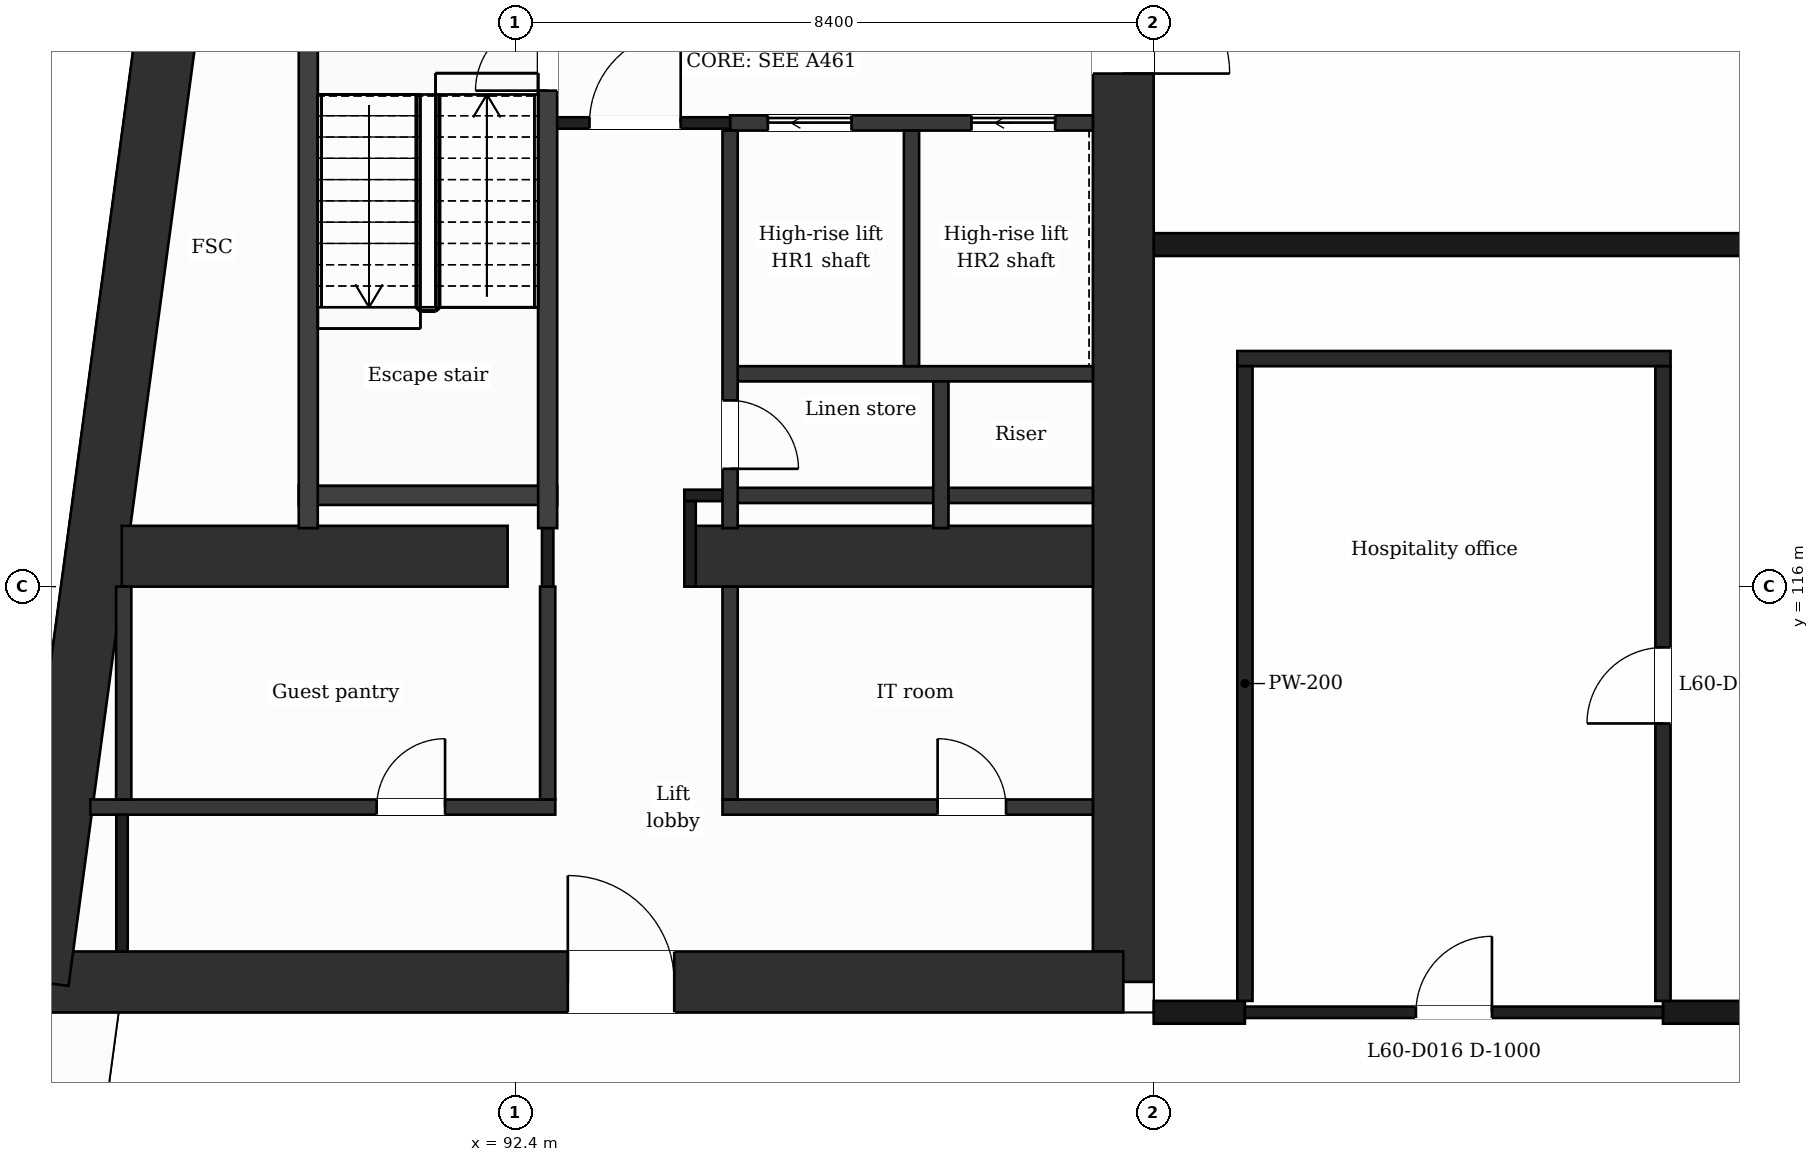
"""IFC4 building model, lengths in metres.
Left out: names, types, materials, properties, quantities, classifications, styles, units other than length and angle.
Written with IfcOpenShell. Run it as: python <this file> out.ifc"""

import sys

from ifc_helpers import new_model, si_unit, direction, frame, frame_2d, origin, place, context, subcontext, project, spatial, rectangle, extrude, element, fill, save


model = new_model("IFC4")
c1 = context("Model", 3, precision=1e-05, world=origin(), true_north=direction((0.0, 1.0)))
c2 = subcontext(c1, "Body", "Model", "MODEL_VIEW")
j1 = project(units=[si_unit("LENGTHUNIT", "METRE"), si_unit("PLANEANGLEUNIT", "RADIAN")], contexts=[c1])
p1 = place(None, origin())
s1 = spatial("IfcSite", under=j1, at=p1, CompositionType="ELEMENT")
p2 = place(p1, origin())
s2 = spatial("IfcBuilding", under=s1, at=p2, CompositionType="ELEMENT")
p3 = place(p2, frame((0.0, 0.0, 246.6)))
s3 = spatial("IfcBuildingStorey", under=s2, at=p3, CompositionType="ELEMENT", Elevation=246.6)
p4 = place(p3, frame((100.4, 132.0, 0.0), z_axis=(0.0, 0.0, 1.0), x_axis=(0.0, -1.0, 0.0)))
e1 = element("IfcWall", 1, at=p4, inside=s3, PredefinedType="SHEAR", context=c2, shape_type="SweptSolid", body=[
    extrude(rectangle(XDim=21.2, YDim=0.8, at=frame_2d((10.6, 0.0))), origin(), (0.0, 0.0, 1.0), 7.4),
])
p5 = place(p4, frame((7.85, 0.0, 0.0)))
e2 = element("IfcOpeningElement", 2, at=p5, cuts=e1, PredefinedType="OPENING", context=c2, shape_type="SweptSolid", body=[
    extrude(rectangle(XDim=1.4, YDim=2.1, at=frame_2d((0.7, 1.05))), frame((0.0, 0.41, 0.0), z_axis=(0.0, -1.0, 0.0), x_axis=(1.0, 0.0, 0.0)), (0.0, 0.0, 1.0), 0.82),
])
p6 = place(p3, frame((100.4, 110.8, 0.0), z_axis=(0.0, 0.0, 1.0), x_axis=(-1.0, 0.0, 0.0)))
e3 = element("IfcWall", 3, at=p6, inside=s3, PredefinedType="SHEAR", context=c2, shape_type="SweptSolid", body=[
    extrude(rectangle(XDim=14.273, YDim=0.8, at=frame_2d((7.137, 0.0))), origin(), (0.0, 0.0, 1.0), 7.4),
])
p7 = place(p6, frame((5.908, 0.0, 0.0)))
e4 = element("IfcOpeningElement", 4, at=p7, cuts=e3, PredefinedType="OPENING", context=c2, shape_type="SweptSolid", body=[
    extrude(rectangle(XDim=1.4, YDim=2.1, at=frame_2d((0.7, 1.05))), frame((0.0, 0.41, 0.0), z_axis=(0.0, -1.0, 0.0), x_axis=(1.0, 0.0, 0.0)), (0.0, 0.0, 1.0), 0.82),
])
p8 = place(p3, frame((86.127, 110.8, 0.0), z_axis=(0.0, 0.0, 1.0), x_axis=(0.133408347329, 0.991061154956, 0.0)))
e5 = element("IfcWall", 5, at=p8, inside=s3, PredefinedType="SHEAR", context=c2, shape_type="SweptSolid", body=[
    extrude(rectangle(XDim=21.391, YDim=0.8, at=frame_2d((10.696, 0.0))), origin(), (0.0, 0.0, 1.0), 7.4),
])
p9 = place(p3, frame((87.223, 116.4, 0.0), z_axis=(0.0, 0.0, 1.0), x_axis=(1.0, 0.0, 0.0)))
e6 = element("IfcWall", 6, at=p9, inside=s3, PredefinedType="SHEAR", context=c2, shape_type="SweptSolid", body=[
    extrude(rectangle(XDim=5.077, YDim=0.8, at=frame_2d((2.539, 0.0))), origin(), (0.0, 0.0, 1.0), 7.4),
])
p10 = place(p3, frame((94.7, 116.4, 0.0), z_axis=(0.0, 0.0, 1.0), x_axis=(1.0, 0.0, 0.0)))
e7 = element("IfcWall", 7, at=p10, inside=s3, PredefinedType="SHEAR", context=c2, shape_type="SweptSolid", body=[
    extrude(rectangle(XDim=5.3, YDim=0.8, at=frame_2d((2.65, 0.0))), origin(), (0.0, 0.0, 1.0), 7.4),
])
p11 = place(p3, frame((100.8, 110.4, 0.0), z_axis=(0.0, 0.0, 1.0), x_axis=(1.0, 0.0, 0.0)))
e8 = element("IfcWall", 8, at=p11, inside=s3, PredefinedType="PARTITIONING", context=c2, shape_type="SweptSolid", body=[
    extrude(rectangle(XDim=1.2, YDim=0.3, at=frame_2d((0.6, 0.0))), origin(), (0.0, 0.0, 1.0), 1.0),
])
p12 = place(p3, frame((107.5, 110.4, 0.0), z_axis=(0.0, 0.0, 1.0), x_axis=(1.0, 0.0, 0.0)))
e9 = element("IfcWall", 9, at=p12, inside=s3, PredefinedType="PARTITIONING", context=c2, shape_type="SweptSolid", body=[
    extrude(rectangle(XDim=3.4, YDim=0.3, at=frame_2d((1.7, 0.0))), origin(), (0.0, 0.0, 1.0), 1.0),
])
p13 = place(p3, frame((102.0, 110.4, 0.0), z_axis=(0.0, 0.0, 1.0), x_axis=(1.0, 0.0, 0.0)))
e10 = element("IfcWall", 10, at=p13, inside=s3, PredefinedType="PARTITIONING", context=c2, shape_type="SweptSolid", body=[
    extrude(rectangle(XDim=5.5, YDim=0.15, at=frame_2d((2.75, 0.0))), origin(), (0.0, 0.0, 1.0), 6.9),
])
p14 = place(p13, frame((2.25, 0.0, 0.0)))
e11 = element("IfcOpeningElement", 11, at=p14, cuts=e10, PredefinedType="OPENING", context=c2, shape_type="SweptSolid", body=[
    extrude(rectangle(XDim=1.0, YDim=2.1, at=frame_2d((0.5, 1.05))), frame((0.0, 0.085, 0.0), z_axis=(0.0, -1.0, 0.0), x_axis=(1.0, 0.0, 0.0)), (0.0, 0.0, 1.0), 0.17),
])
p15 = place(p3, frame((86.81, 113.1, 0.0), z_axis=(0.0, 0.0, 1.0), x_axis=(1.0, 0.0, 0.0)))
e12 = element("IfcWall", 12, at=p15, inside=s3, PredefinedType="PARTITIONING", context=c2, shape_type="SweptSolid", body=[
    extrude(rectangle(XDim=6.117, YDim=0.2, at=frame_2d((3.059, 0.0))), origin(), (0.0, 0.0, 1.0), 6.9),
])
p16 = place(p15, frame((3.767, 0.0, 0.0)))
e13 = element("IfcOpeningElement", 13, at=p16, cuts=e12, PredefinedType="OPENING", context=c2, shape_type="SweptSolid", body=[
    extrude(rectangle(XDim=0.9, YDim=2.1, at=frame_2d((0.45, 1.05))), frame((0.0, 0.11, 0.0), z_axis=(0.0, -1.0, 0.0), x_axis=(1.0, 0.0, 0.0)), (0.0, 0.0, 1.0), 0.22),
])
p17 = place(p3, frame((95.127, 113.1, 0.0), z_axis=(0.0, 0.0, 1.0), x_axis=(1.0, 0.0, 0.0)))
e14 = element("IfcWall", 14, at=p17, inside=s3, PredefinedType="PARTITIONING", context=c2, shape_type="SweptSolid", body=[
    extrude(rectangle(XDim=4.873, YDim=0.2, at=frame_2d((2.437, 0.0))), origin(), (0.0, 0.0, 1.0), 6.9),
])
p18 = place(p17, frame((2.83, 0.0, 0.0)))
e15 = element("IfcOpeningElement", 15, at=p18, cuts=e14, PredefinedType="OPENING", context=c2, shape_type="SweptSolid", body=[
    extrude(rectangle(XDim=0.9, YDim=2.1, at=frame_2d((0.45, 1.05))), frame((0.0, 0.11, 0.0), z_axis=(0.0, -1.0, 0.0), x_axis=(1.0, 0.0, 0.0)), (0.0, 0.0, 1.0), 0.22),
])
p19 = place(p3, frame((95.227, 117.2, 0.0), z_axis=(0.0, 0.0, 1.0), x_axis=(1.0, 0.0, 0.0)))
e16 = element("IfcWall", 16, at=p19, inside=s3, PredefinedType="PARTITIONING", context=c2, shape_type="SweptSolid", body=[
    extrude(rectangle(XDim=4.773, YDim=0.2, at=frame_2d((2.386, 0.0))), origin(), (0.0, 0.0, 1.0), 6.9),
])
p20 = place(p3, frame((94.625, 117.2, 0.0), z_axis=(0.0, 0.0, 1.0), x_axis=(1.0, 0.0, 0.0)))
e17 = element("IfcWall", 17, at=p20, inside=s3, PredefinedType="PARTITIONING", context=c2, shape_type="SweptSolid", body=[
    extrude(rectangle(XDim=0.602, YDim=0.15, at=frame_2d((0.301, 0.0))), origin(), (0.0, 0.0, 1.0), 6.9),
])
p21 = place(p3, frame((89.552, 117.2, 0.0), z_axis=(0.0, 0.0, 1.0), x_axis=(1.0, 0.0, 0.0)))
e18 = element("IfcWall", 18, at=p21, inside=s3, PredefinedType="PARTITIONING", context=c2, shape_type="SweptSolid", body=[
    extrude(rectangle(XDim=3.4, YDim=0.25, at=frame_2d((1.7, 0.0))), origin(), (0.0, 0.0, 1.0), 6.9),
])
p22 = place(p3, frame((95.227, 118.8, 0.0), z_axis=(0.0, 0.0, 1.0), x_axis=(1.0, 0.0, 0.0)))
e19 = element("IfcWall", 19, at=p22, inside=s3, PredefinedType="PARTITIONING", context=c2, shape_type="SweptSolid", body=[
    extrude(rectangle(XDim=4.773, YDim=0.2, at=frame_2d((2.386, 0.0))), origin(), (0.0, 0.0, 1.0), 6.9),
])
p23 = place(p3, frame((101.9, 119.0, 0.0), z_axis=(0.0, 0.0, 1.0), x_axis=(1.0, 0.0, 0.0)))
e20 = element("IfcWall", 20, at=p23, inside=s3, PredefinedType="PARTITIONING", context=c2, shape_type="SweptSolid", body=[
    extrude(rectangle(XDim=5.7, YDim=0.2, at=frame_2d((2.85, 0.0))), origin(), (0.0, 0.0, 1.0), 6.9),
])
p24 = place(p3, frame((100.8, 120.5, 0.0), z_axis=(0.0, 0.0, 1.0), x_axis=(1.0, 0.0, 0.0)))
e21 = element("IfcWall", 21, at=p24, inside=s3, PredefinedType="PARTITIONING", context=c2, shape_type="SweptSolid", body=[
    extrude(rectangle(XDim=25.2, YDim=0.3, at=frame_2d((12.6, 0.0))), origin(), (0.0, 0.0, 1.0), 1.0),
])
p25 = place(p3, frame((95.227, 122.1, 0.0), z_axis=(0.0, 0.0, 1.0), x_axis=(1.0, 0.0, 0.0)))
e22 = element("IfcWall", 22, at=p25, inside=s3, PredefinedType="PARTITIONING", context=c2, shape_type="SweptSolid", body=[
    extrude(rectangle(XDim=4.773, YDim=0.2, at=frame_2d((2.386, 0.0))), origin(), (0.0, 0.0, 1.0), 6.9),
])
p26 = place(p25, frame((0.497, 0.0, 0.0)))
e23 = element("IfcOpeningElement", 23, at=p26, cuts=e22, PredefinedType="OPENING", context=c2, shape_type="SweptSolid", body=[
    extrude(rectangle(XDim=1.1, YDim=2.1, at=frame_2d((0.55, 1.05))), frame((0.0, 0.11, 0.0), z_axis=(0.0, -1.0, 0.0), x_axis=(1.0, 0.0, 0.0)), (0.0, 0.0, 1.0), 0.22),
])
p27 = place(p25, frame((3.176, 0.0, 0.0)))
e24 = element("IfcOpeningElement", 24, at=p27, cuts=e22, PredefinedType="OPENING", context=c2, shape_type="SweptSolid", body=[
    extrude(rectangle(XDim=1.1, YDim=2.1, at=frame_2d((0.55, 1.05))), frame((0.0, 0.11, 0.0), z_axis=(0.0, -1.0, 0.0), x_axis=(1.0, 0.0, 0.0)), (0.0, 0.0, 1.0), 0.22),
])
p28 = place(p3, frame((92.827, 122.1, 0.0), z_axis=(0.0, 0.0, 1.0), x_axis=(1.0, 0.0, 0.0)))
e25 = element("IfcWall", 25, at=p28, inside=s3, PredefinedType="PARTITIONING", context=c2, shape_type="SweptSolid", body=[
    extrude(rectangle(XDim=2.4, YDim=0.15, at=frame_2d((1.2, 0.0))), origin(), (0.0, 0.0, 1.0), 6.9),
])
p29 = place(p28, frame((0.55, 0.0, 0.0)))
e26 = element("IfcOpeningElement", 26, at=p29, cuts=e25, PredefinedType="OPENING", context=c2, shape_type="SweptSolid", body=[
    extrude(rectangle(XDim=1.2, YDim=2.1, at=frame_2d((0.6, 1.05))), frame((0.0, 0.085, 0.0), z_axis=(0.0, -1.0, 0.0), x_axis=(1.0, 0.0, 0.0)), (0.0, 0.0, 1.0), 0.17),
])
p30 = place(p3, frame((87.25, 113.2, 0.0), z_axis=(0.0, 0.0, 1.0), x_axis=(0.0, 1.0, 0.0)))
e27 = element("IfcWall", 27, at=p30, inside=s3, PredefinedType="PARTITIONING", context=c2, shape_type="SweptSolid", body=[
    extrude(rectangle(XDim=2.8, YDim=0.2, at=frame_2d((1.4, 0.0))), origin(), (0.0, 0.0, 1.0), 6.9),
])
p31 = place(p3, frame((87.227, 111.2, 0.0), z_axis=(0.0, 0.0, 1.0), x_axis=(0.0, 1.0, 0.0)))
e28 = element("IfcWall", 28, at=p31, inside=s3, PredefinedType="PARTITIONING", context=c2, shape_type="SweptSolid", body=[
    extrude(rectangle(XDim=1.8, YDim=0.15, at=frame_2d((0.9, 0.0))), origin(), (0.0, 0.0, 1.0), 6.9),
])
p32 = place(p3, frame((89.677, 116.77, 0.0), z_axis=(0.0, 0.0, 1.0), x_axis=(0.0, 1.0, 0.0)))
e29 = element("IfcWall", 29, at=p32, inside=s3, PredefinedType="PARTITIONING", context=c2, shape_type="SweptSolid", body=[
    extrude(rectangle(XDim=7.055, YDim=0.25, at=frame_2d((3.527, 0.0))), origin(), (0.0, 0.0, 1.0), 6.9),
])
p33 = place(p3, frame((92.827, 113.2, 0.0), z_axis=(0.0, 0.0, 1.0), x_axis=(0.0, 1.0, 0.0)))
e30 = element("IfcWall", 30, at=p33, inside=s3, PredefinedType="PARTITIONING", context=c2, shape_type="SweptSolid", body=[
    extrude(rectangle(XDim=2.8, YDim=0.2, at=frame_2d((1.4, 0.0))), origin(), (0.0, 0.0, 1.0), 6.9),
])
p34 = place(p3, frame((92.827, 116.0, 0.0), z_axis=(0.0, 0.0, 1.0), x_axis=(0.0, 1.0, 0.0)))
e31 = element("IfcWall", 31, at=p34, inside=s3, PredefinedType="PARTITIONING", context=c2, shape_type="SweptSolid", body=[
    extrude(rectangle(XDim=0.77, YDim=0.15, at=frame_2d((0.385, 0.0))), origin(), (0.0, 0.0, 1.0), 6.9),
])
p35 = place(p3, frame((92.827, 116.77, 0.0), z_axis=(0.0, 0.0, 1.0), x_axis=(0.0, 1.0, 0.0)))
e32 = element("IfcWall", 32, at=p35, inside=s3, PredefinedType="PARTITIONING", context=c2, shape_type="SweptSolid", body=[
    extrude(rectangle(XDim=7.055, YDim=0.25, at=frame_2d((3.527, 0.0))), origin(), (0.0, 0.0, 1.0), 6.9),
])
p36 = place(p35, frame((5.755, 0.0, 0.0)))
e33 = element("IfcOpeningElement", 33, at=p36, cuts=e32, PredefinedType="OPENING", context=c2, shape_type="SweptSolid", body=[
    extrude(rectangle(XDim=0.95, YDim=2.1, at=frame_2d((0.475, 1.05))), frame((0.0, 0.135, 0.0), z_axis=(0.0, -1.0, 0.0), x_axis=(1.0, 0.0, 0.0)), (0.0, 0.0, 1.0), 0.27),
])
p37 = place(p3, frame((94.7, 116.0, 0.0), z_axis=(0.0, 0.0, 1.0), x_axis=(0.0, 1.0, 0.0)))
e34 = element("IfcWall", 34, at=p37, inside=s3, PredefinedType="PARTITIONING", context=c2, shape_type="SweptSolid", body=[
    extrude(rectangle(XDim=1.125, YDim=0.15, at=frame_2d((0.562, 0.0))), origin(), (0.0, 0.0, 1.0), 6.9),
])
p38 = place(p3, frame((95.227, 113.2, 0.0), z_axis=(0.0, 0.0, 1.0), x_axis=(0.0, 1.0, 0.0)))
e35 = element("IfcWall", 35, at=p38, inside=s3, PredefinedType="PARTITIONING", context=c2, shape_type="SweptSolid", body=[
    extrude(rectangle(XDim=2.8, YDim=0.2, at=frame_2d((1.4, 0.0))), origin(), (0.0, 0.0, 1.0), 6.9),
])
p39 = place(p3, frame((95.227, 116.77, 0.0), z_axis=(0.0, 0.0, 1.0), x_axis=(0.0, 1.0, 0.0)))
e36 = element("IfcWall", 36, at=p39, inside=s3, PredefinedType="PARTITIONING", context=c2, shape_type="SweptSolid", body=[
    extrude(rectangle(XDim=5.23, YDim=0.2, at=frame_2d((2.615, 0.0))), origin(), (0.0, 0.0, 1.0), 6.9),
])
p40 = place(p39, frame((0.78, 0.0, 0.0)))
e37 = element("IfcOpeningElement", 37, at=p40, cuts=e36, PredefinedType="OPENING", context=c2, shape_type="SweptSolid", body=[
    extrude(rectangle(XDim=0.9, YDim=2.1, at=frame_2d((0.45, 1.05))), frame((0.0, 0.11, 0.0), z_axis=(0.0, -1.0, 0.0), x_axis=(1.0, 0.0, 0.0)), (0.0, 0.0, 1.0), 0.22),
])
p41 = place(p3, frame((97.614, 118.9, 0.0), z_axis=(0.0, 0.0, 1.0), x_axis=(0.0, 1.0, 0.0)))
e38 = element("IfcWall", 38, at=p41, inside=s3, PredefinedType="PARTITIONING", context=c2, shape_type="SweptSolid", body=[
    extrude(rectangle(XDim=3.1, YDim=0.2, at=frame_2d((1.55, 0.0))), origin(), (0.0, 0.0, 1.0), 6.9),
])
p42 = place(p3, frame((98.0, 116.77, 0.0), z_axis=(0.0, 0.0, 1.0), x_axis=(0.0, 1.0, 0.0)))
e39 = element("IfcWall", 39, at=p42, inside=s3, PredefinedType="PARTITIONING", context=c2, shape_type="SweptSolid", body=[
    extrude(rectangle(XDim=1.93, YDim=0.2, at=frame_2d((0.965, 0.0))), origin(), (0.0, 0.0, 1.0), 6.9),
])
p43 = place(p3, frame((102.0, 110.55, 0.0), z_axis=(0.0, 0.0, 1.0), x_axis=(0.0, 1.0, 0.0)))
e40 = element("IfcWall", 40, at=p43, inside=s3, PredefinedType="PARTITIONING", context=c2, shape_type="SweptSolid", body=[
    extrude(rectangle(XDim=8.35, YDim=0.2, at=frame_2d((4.175, 0.0))), origin(), (0.0, 0.0, 1.0), 6.9),
])
p44 = place(p3, frame((107.5, 110.55, 0.0), z_axis=(0.0, 0.0, 1.0), x_axis=(0.0, 1.0, 0.0)))
e41 = element("IfcWall", 41, at=p44, inside=s3, PredefinedType="PARTITIONING", context=c2, shape_type="SweptSolid", body=[
    extrude(rectangle(XDim=8.35, YDim=0.2, at=frame_2d((4.175, 0.0))), origin(), (0.0, 0.0, 1.0), 6.9),
])
p45 = place(p44, frame((3.65, 0.0, 0.0)))
e42 = element("IfcOpeningElement", 42, at=p45, cuts=e41, PredefinedType="OPENING", context=c2, shape_type="SweptSolid", body=[
    extrude(rectangle(XDim=1.0, YDim=2.1, at=frame_2d((0.5, 1.05))), frame((0.0, 0.11, 0.0), z_axis=(0.0, -1.0, 0.0), x_axis=(1.0, 0.0, 0.0)), (0.0, 0.0, 1.0), 0.22),
])
p46 = place(p14, origin())
e43 = element("IfcDoor", 43, at=p46, inside=s3, OperationType="SINGLE_SWING_RIGHT", PredefinedType="DOOR", context=c2, shape_type="SweptSolid", body=[
    extrude(rectangle(XDim=1.0, YDim=2.1, at=frame_2d((0.5, 1.05))), frame((0.0, 0.025, 0.0), z_axis=(0.0, -1.0, 0.0), x_axis=(1.0, 0.0, 0.0)), (0.0, 0.0, 1.0), 0.05),
])
fill(e11, e43)
p47 = place(p45, origin())
e44 = element("IfcDoor", 44, at=p47, inside=s3, OperationType="SINGLE_SWING_LEFT", PredefinedType="DOOR", context=c2, shape_type="SweptSolid", body=[
    extrude(rectangle(XDim=1.0, YDim=2.1, at=frame_2d((0.5, 1.05))), frame((0.0, 0.025, 0.0), z_axis=(0.0, -1.0, 0.0), x_axis=(1.0, 0.0, 0.0)), (0.0, 0.0, 1.0), 0.05),
])
fill(e42, e44)
p48 = place(p29, origin())
e45 = element("IfcDoor", 45, at=p48, inside=s3, OperationType="SINGLE_SWING_RIGHT", PredefinedType="DOOR", context=c2, shape_type="SweptSolid", body=[
    extrude(rectangle(XDim=1.2, YDim=2.1, at=frame_2d((0.6, 1.05))), frame((0.0, 0.025, 0.0), z_axis=(0.0, -1.0, 0.0), x_axis=(1.0, 0.0, 0.0)), (0.0, 0.0, 1.0), 0.05),
])
fill(e26, e45)
p49 = place(p26, origin())
e46 = element("IfcDoor", 46, at=p49, inside=s3, OperationType="SLIDING_TO_LEFT", PredefinedType="DOOR", context=c2, shape_type="SweptSolid", body=[
    extrude(rectangle(XDim=1.1, YDim=2.1, at=frame_2d((0.55, 1.05))), frame((0.0, 0.025, 0.0), z_axis=(0.0, -1.0, 0.0), x_axis=(1.0, 0.0, 0.0)), (0.0, 0.0, 1.0), 0.05),
])
fill(e23, e46)
p50 = place(p27, origin())
e47 = element("IfcDoor", 47, at=p50, inside=s3, OperationType="SLIDING_TO_LEFT", PredefinedType="DOOR", context=c2, shape_type="SweptSolid", body=[
    extrude(rectangle(XDim=1.1, YDim=2.1, at=frame_2d((0.55, 1.05))), frame((0.0, 0.025, 0.0), z_axis=(0.0, -1.0, 0.0), x_axis=(1.0, 0.0, 0.0)), (0.0, 0.0, 1.0), 0.05),
])
fill(e24, e47)
p51 = place(p36, origin())
e48 = element("IfcDoor", 48, at=p51, inside=s3, OperationType="SINGLE_SWING_LEFT", PredefinedType="DOOR", context=c2, shape_type="SweptSolid", body=[
    extrude(rectangle(XDim=0.95, YDim=2.1, at=frame_2d((0.475, 1.05))), frame((0.0, 0.025, 0.0), z_axis=(0.0, -1.0, 0.0), x_axis=(1.0, 0.0, 0.0)), (0.0, 0.0, 1.0), 0.05),
])
fill(e33, e48)
p52 = place(p40, origin())
e49 = element("IfcDoor", 49, at=p52, inside=s3, OperationType="SINGLE_SWING_LEFT", PredefinedType="DOOR", context=c2, shape_type="SweptSolid", body=[
    extrude(rectangle(XDim=0.9, YDim=2.1, at=frame_2d((0.45, 1.05))), frame((0.0, 0.025, 0.0), z_axis=(0.0, -1.0, 0.0), x_axis=(1.0, 0.0, 0.0)), (0.0, 0.0, 1.0), 0.05),
])
fill(e37, e49)
p53 = place(p16, origin())
e50 = element("IfcDoor", 50, at=p53, inside=s3, OperationType="SINGLE_SWING_RIGHT", PredefinedType="DOOR", context=c2, shape_type="SweptSolid", body=[
    extrude(rectangle(XDim=0.9, YDim=2.1, at=frame_2d((0.45, 1.05))), frame((0.0, 0.025, 0.0), z_axis=(0.0, -1.0, 0.0), x_axis=(1.0, 0.0, 0.0)), (0.0, 0.0, 1.0), 0.05),
])
fill(e13, e50)
p54 = place(p18, origin())
e51 = element("IfcDoor", 51, at=p54, inside=s3, OperationType="SINGLE_SWING_LEFT", PredefinedType="DOOR", context=c2, shape_type="SweptSolid", body=[
    extrude(rectangle(XDim=0.9, YDim=2.1, at=frame_2d((0.45, 1.05))), frame((0.0, 0.025, 0.0), z_axis=(0.0, -1.0, 0.0), x_axis=(1.0, 0.0, 0.0)), (0.0, 0.0, 1.0), 0.05),
])
fill(e15, e51)
p55 = place(p7, origin())
e52 = element("IfcDoor", 52, at=p55, inside=s3, OperationType="SINGLE_SWING_RIGHT", PredefinedType="DOOR", context=c2, shape_type="SweptSolid", body=[
    extrude(rectangle(XDim=1.4, YDim=2.1, at=frame_2d((0.7, 1.05))), frame((0.0, 0.025, 0.0), z_axis=(0.0, -1.0, 0.0), x_axis=(1.0, 0.0, 0.0)), (0.0, 0.0, 1.0), 0.05),
])
fill(e4, e52)
p56 = place(p5, origin())
e53 = element("IfcDoor", 53, at=p56, inside=s3, OperationType="SINGLE_SWING_RIGHT", PredefinedType="DOOR", context=c2, shape_type="SweptSolid", body=[
    extrude(rectangle(XDim=1.4, YDim=2.1, at=frame_2d((0.7, 1.05))), frame((0.0, 0.025, 0.0), z_axis=(0.0, -1.0, 0.0), x_axis=(1.0, 0.0, 0.0)), (0.0, 0.0, 1.0), 0.05),
])
fill(e2, e53)
save(model, sys.argv[1])
